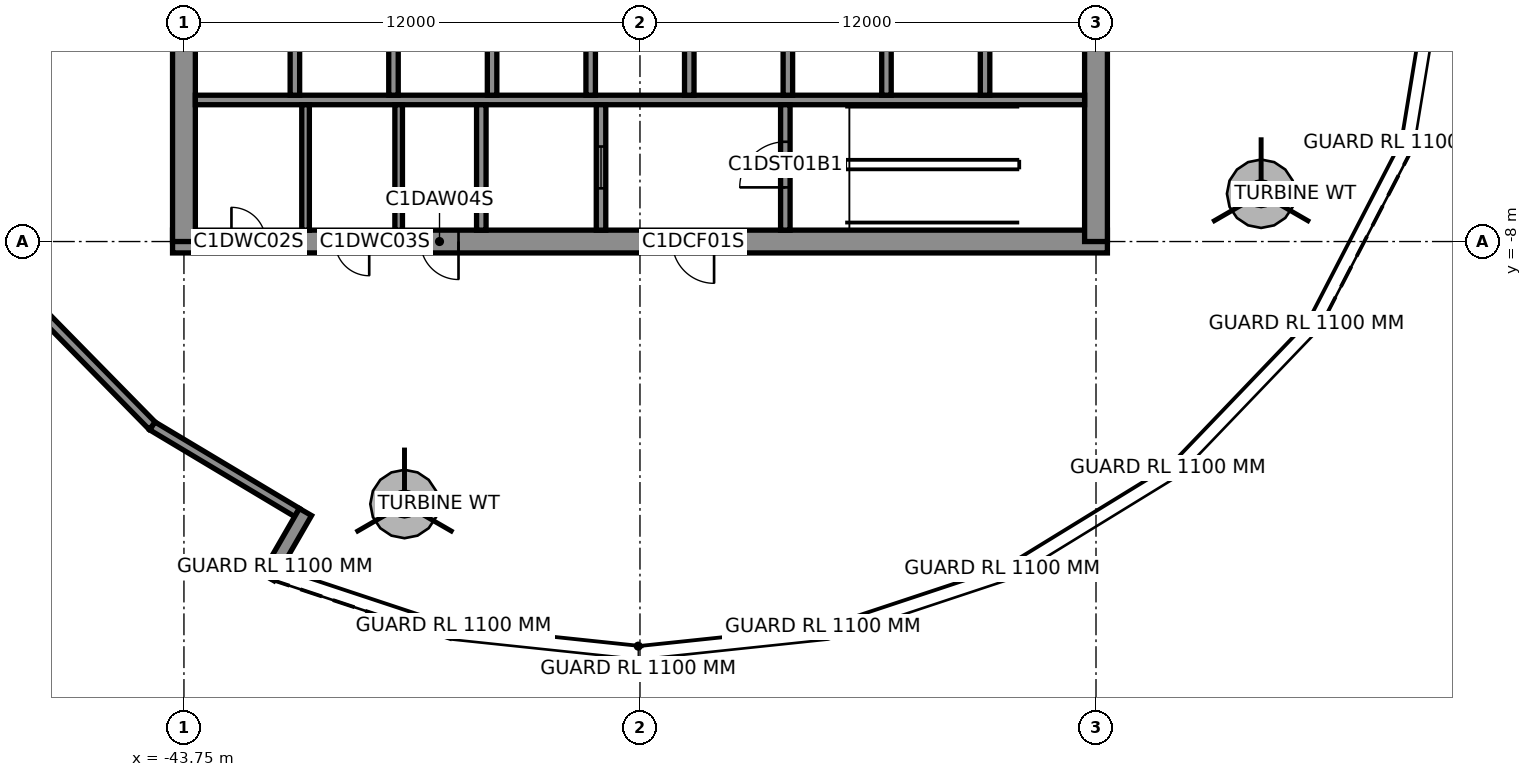
"""IFC4 building model, lengths in metres.
Left out: names, types, materials, properties, quantities, classifications, styles, units other than length and angle.
Written with IfcOpenShell. Run it as: python <this file> out.ifc"""

import sys

from ifc_helpers import new_model, si_unit, direction, frame, frame_2d, origin, place, context, subcontext, project, spatial, rectangle, extrude, element, fill, save


model = new_model("IFC4")
c1 = context("Model", 3, precision=1e-05, world=origin(), true_north=direction((0.0, 1.0)))
c2 = subcontext(c1, "Body", "Model", "MODEL_VIEW")
j1 = project(units=[si_unit("LENGTHUNIT", "METRE"), si_unit("PLANEANGLEUNIT", "RADIAN")], contexts=[c1])
p1 = place(None, origin())
s1 = spatial("IfcSite", under=j1, at=p1, CompositionType="ELEMENT")
p2 = place(p1, origin())
s2 = spatial("IfcBuilding", under=s1, at=p2, CompositionType="ELEMENT")
p3 = place(p2, frame((0.0, 0.0, 204.5)))
s3 = spatial("IfcBuildingStorey", under=s2, at=p3, CompositionType="ELEMENT", Elevation=204.5)
p4 = place(p3, frame((-44.581, -12.852, 0.0), z_axis=(0.0, 0.0, 1.0), x_axis=(-0.700565408789, 0.713588192172, 0.0)))
e1 = element("IfcWall", 1, at=p4, inside=s3, PredefinedType="STANDARD", context=c2, shape_type="SweptSolid", body=[
    extrude(rectangle(XDim=4.855, YDim=0.25, at=frame_2d((2.428, 0.0))), origin(), (0.0, 0.0, 1.0), 5.396),
])
p5 = place(p3, frame((-40.774, -15.13, 0.0), z_axis=(0.0, 0.0, 1.0), x_axis=(-0.858196185846, 0.513321835304, 0.0)))
e2 = element("IfcWall", 2, at=p5, inside=s3, PredefinedType="STANDARD", context=c2, shape_type="SweptSolid", body=[
    extrude(rectangle(XDim=4.437, YDim=0.25, at=frame_2d((2.218, 0.0))), origin(), (0.0, 0.0, 1.0), 5.396),
])
p6 = place(p3, frame((-41.543, -16.832, 0.0), z_axis=(0.0, 0.0, 1.0), x_axis=(0.500024883228, 0.866011036969, 0.0)))
e3 = element("IfcWall", 3, at=p6, inside=s3, PredefinedType="STANDARD", context=c2, shape_type="SweptSolid", body=[
    extrude(rectangle(XDim=1.98, YDim=0.37, at=frame_2d((0.99, 0.0))), origin(), (0.0, 0.0, 1.0), 5.317),
])
p7 = place(p3, frame((-44.05, -8.0, 0.0), z_axis=(0.0, 0.0, 1.0), x_axis=(1.0, 0.0, 0.0)))
e4 = element("IfcWall", 4, at=p7, inside=s3, PredefinedType="SHEAR", context=c2, shape_type="SweptSolid", body=[
    extrude(rectangle(XDim=24.6, YDim=0.6, at=frame_2d((12.3, 0.0))), origin(), (0.0, 0.0, 1.0), 6.0),
])
p8 = place(p7, frame((13.15, 0.0, 0.0)))
e5 = element("IfcOpeningElement", 5, at=p8, cuts=e4, PredefinedType="OPENING", context=c2, shape_type="SweptSolid", body=[
    extrude(rectangle(XDim=1.1, YDim=2.1, at=frame_2d((0.55, 1.05))), frame((0.0, 0.31, 0.0), z_axis=(0.0, -1.0, 0.0), x_axis=(1.0, 0.0, 0.0)), (0.0, 0.0, 1.0), 0.62),
])
p9 = place(p7, frame((1.55, 0.0, 0.0)))
e6 = element("IfcOpeningElement", 6, at=p9, cuts=e4, PredefinedType="OPENING", context=c2, shape_type="SweptSolid", body=[
    extrude(rectangle(XDim=0.9, YDim=2.1, at=frame_2d((0.45, 1.05))), frame((0.0, 0.31, 0.0), z_axis=(0.0, -1.0, 0.0), x_axis=(1.0, 0.0, 0.0)), (0.0, 0.0, 1.0), 0.62),
])
p10 = place(p7, frame((4.275, 0.0, 0.0)))
e7 = element("IfcOpeningElement", 7, at=p10, cuts=e4, PredefinedType="OPENING", context=c2, shape_type="SweptSolid", body=[
    extrude(rectangle(XDim=0.9, YDim=2.1, at=frame_2d((0.45, 1.05))), frame((0.0, 0.31, 0.0), z_axis=(0.0, -1.0, 0.0), x_axis=(1.0, 0.0, 0.0)), (0.0, 0.0, 1.0), 0.62),
])
p11 = place(p7, frame((6.525, 0.0, 0.0)))
e8 = element("IfcOpeningElement", 8, at=p11, cuts=e4, PredefinedType="OPENING", context=c2, shape_type="SweptSolid", body=[
    extrude(rectangle(XDim=1.0, YDim=2.1, at=frame_2d((0.5, 1.05))), frame((0.0, 0.31, 0.0), z_axis=(0.0, -1.0, 0.0), x_axis=(1.0, 0.0, 0.0)), (0.0, 0.0, 1.0), 0.62),
])
p12 = place(p3, frame((-19.75, -8.0, 0.0), z_axis=(0.0, 0.0, 1.0), x_axis=(0.0, 1.0, 0.0)))
e9 = element("IfcWall", 9, at=p12, inside=s3, PredefinedType="SHEAR", context=c2, shape_type="SweptSolid", body=[
    extrude(rectangle(XDim=16.0, YDim=0.6, at=frame_2d((8.0, 0.0))), origin(), (0.0, 0.0, 1.0), 6.0),
])
p13 = place(p12, frame((7.1, 0.0, 0.0)))
e10 = element("IfcOpeningElement", 10, at=p13, cuts=e9, PredefinedType="OPENING", context=c2, shape_type="SweptSolid", body=[
    extrude(rectangle(XDim=1.8, YDim=2.1, at=frame_2d((0.9, 1.05))), frame((0.0, 0.31, 0.0), z_axis=(0.0, -1.0, 0.0), x_axis=(1.0, 0.0, 0.0)), (0.0, 0.0, 1.0), 0.62),
])
p14 = place(p3, frame((-43.75, -8.0, 0.0), z_axis=(0.0, 0.0, 1.0), x_axis=(0.0, 1.0, 0.0)))
e11 = element("IfcWall", 11, at=p14, inside=s3, PredefinedType="SHEAR", context=c2, shape_type="SweptSolid", body=[
    extrude(rectangle(XDim=16.0, YDim=0.6, at=frame_2d((8.0, 0.0))), origin(), (0.0, 0.0, 1.0), 6.0),
])
p15 = place(p14, frame((7.1, 0.0, 0.0)))
e12 = element("IfcOpeningElement", 12, at=p15, cuts=e11, PredefinedType="OPENING", context=c2, shape_type="SweptSolid", body=[
    extrude(rectangle(XDim=1.8, YDim=2.1, at=frame_2d((0.9, 1.05))), frame((0.0, 0.31, 0.0), z_axis=(0.0, -1.0, 0.0), x_axis=(1.0, 0.0, 0.0)), (0.0, 0.0, 1.0), 0.62),
])
p16 = place(p3, frame((-43.45, -4.275, 0.0), z_axis=(0.0, 0.0, 1.0), x_axis=(1.0, 0.0, 0.0)))
e13 = element("IfcWall", 13, at=p16, inside=s3, PredefinedType="SHEAR", context=c2, shape_type="SweptSolid", body=[
    extrude(rectangle(XDim=23.4, YDim=0.25, at=frame_2d((11.7, 0.0))), origin(), (0.0, 0.0, 1.0), 6.0),
])
for number, where, z_axis, x_axis in (
    (14, (-40.831, -4.15, 0.0), (0.0, 0.0, 1.0), (0.0, 1.0, 0.0)),
    (15, (-38.236, -4.15, 0.0), (0.0, 0.0, 1.0), (0.0, 1.0, 0.0)),
    (16, (-35.642, -4.15, 0.0), (0.0, 0.0, 1.0), (0.0, 1.0, 0.0)),
    (17, (-33.047, -4.15, 0.0), (0.0, 0.0, 1.0), (0.0, 1.0, 0.0)),
    (18, (-30.453, -4.15, 0.0), (0.0, 0.0, 1.0), (0.0, 1.0, 0.0)),
    (19, (-27.858, -4.15, 0.0), (0.0, 0.0, 1.0), (0.0, 1.0, 0.0)),
    (20, (-25.264, -4.15, 0.0), (0.0, 0.0, 1.0), (0.0, 1.0, 0.0)),
    (21, (-22.669, -4.15, 0.0), (0.0, 0.0, 1.0), (0.0, 1.0, 0.0)),
):
    element("IfcWall", number, at=place(p3, frame(where, z_axis=z_axis, x_axis=x_axis)), inside=s3, PredefinedType="SHEAR", context=c2, shape_type="SweptSolid", body=[
        extrude(rectangle(XDim=2.4, YDim=0.25, at=frame_2d((1.2, 0.0))), origin(), (0.0, 0.0, 1.0), 6.0),
    ])
p17 = place(p3, frame((-27.925, -4.4, 0.0), z_axis=(0.0, 0.0, 1.0), x_axis=(0.0, -1.0, 0.0)))
e22 = element("IfcWall", 22, at=p17, inside=s3, PredefinedType="SHEAR", context=c2, shape_type="SweptSolid", body=[
    extrude(rectangle(XDim=3.3, YDim=0.25, at=frame_2d((1.65, 0.0))), origin(), (0.0, 0.0, 1.0), 6.0),
])
p18 = place(p17, frame((0.975, 0.0, 0.0)))
e23 = element("IfcOpeningElement", 23, at=p18, cuts=e22, PredefinedType="OPENING", context=c2, shape_type="SweptSolid", body=[
    extrude(rectangle(XDim=1.2, YDim=2.1, at=frame_2d((0.6, 1.05))), frame((0.0, 0.135, 0.0), z_axis=(0.0, -1.0, 0.0), x_axis=(1.0, 0.0, 0.0)), (0.0, 0.0, 1.0), 0.27),
])
p19 = place(p3, frame((-32.775, -4.4, 0.0), z_axis=(0.0, 0.0, 1.0), x_axis=(0.0, -1.0, 0.0)))
e24 = element("IfcWall", 24, at=p19, inside=s3, PredefinedType="SHEAR", context=c2, shape_type="SweptSolid", body=[
    extrude(rectangle(XDim=3.3, YDim=0.25, at=frame_2d((1.65, 0.0))), origin(), (0.0, 0.0, 1.0), 6.0),
])
p20 = place(p19, frame((1.1, 0.0, 0.0)))
e25 = element("IfcOpeningElement", 25, at=p20, cuts=e24, PredefinedType="OPENING", context=c2, shape_type="SweptSolid", body=[
    extrude(rectangle(XDim=1.1, YDim=2.1, at=frame_2d((0.55, 1.05))), frame((0.0, 0.135, 0.0), z_axis=(0.0, -1.0, 0.0), x_axis=(1.0, 0.0, 0.0)), (0.0, 0.0, 1.0), 0.27),
])
p21 = place(p3, frame((-35.925, -4.4, 0.0), z_axis=(0.0, 0.0, 1.0), x_axis=(0.0, -1.0, 0.0)))
e26 = element("IfcWall", 26, at=p21, inside=s3, PredefinedType="SHEAR", context=c2, shape_type="SweptSolid", body=[
    extrude(rectangle(XDim=3.3, YDim=0.25, at=frame_2d((1.65, 0.0))), origin(), (0.0, 0.0, 1.0), 6.0),
])
for number, where, z_axis, x_axis in (
    (27, (-40.55, -4.4, 0.0), (0.0, 0.0, 1.0), (0.0, -1.0, 0.0)),
    (28, (-38.1, -4.4, 0.0), (0.0, 0.0, 1.0), (0.0, -1.0, 0.0)),
):
    element("IfcWall", number, at=place(p3, frame(where, z_axis=z_axis, x_axis=x_axis)), inside=s3, PredefinedType="PARTITIONING", context=c2, shape_type="SweptSolid", body=[
        extrude(rectangle(XDim=3.3, YDim=0.2, at=frame_2d((1.65, 0.0))), origin(), (0.0, 0.0, 1.0), 6.0),
    ])
p22 = place(p3, frame((-46.304, -11.0, 0.0), z_axis=(0.0, 0.0, 1.0), x_axis=(1.0, 0.0, 0.0)))
e29 = element("IfcWall", 29, at=p22, inside=s3, PredefinedType="PARTITIONING", context=c2, shape_type="SweptSolid", body=[
    extrude(rectangle(XDim=11.607, YDim=0.2, at=frame_2d((5.803, 0.0))), origin(), (0.0, 0.0, 1.0), 5.307),
])
p23 = place(p22, frame((5.303, 0.0, 0.0)))
e30 = element("IfcOpeningElement", 30, at=p23, cuts=e29, PredefinedType="OPENING", context=c2, shape_type="SweptSolid", body=[
    extrude(rectangle(XDim=1.0, YDim=2.1, at=frame_2d((0.5, 1.05))), frame((0.0, 0.11, 0.0), z_axis=(0.0, -1.0, 0.0), x_axis=(1.0, 0.0, 0.0)), (0.0, 0.0, 1.0), 0.22),
])
p24 = place(p3, frame((-34.698, -11.0, 0.0), z_axis=(0.0, 0.0, 1.0), x_axis=(1.0, 0.0, 0.0)))
e31 = element("IfcWall", 31, at=p24, inside=s3, PredefinedType="PARTITIONING", context=c2, shape_type="SweptSolid", body=[
    extrude(rectangle(XDim=9.298, YDim=0.2, at=frame_2d((4.649, 0.0))), origin(), (0.0, 0.0, 1.0), 5.307),
])
p25 = place(p24, frame((3.039, 0.0, 0.0)))
e32 = element("IfcOpeningElement", 32, at=p25, cuts=e31, PredefinedType="OPENING", context=c2, shape_type="SweptSolid", body=[
    extrude(rectangle(XDim=1.0, YDim=2.1, at=frame_2d((0.5, 1.05))), frame((0.0, 0.11, 0.0), z_axis=(0.0, -1.0, 0.0), x_axis=(1.0, 0.0, 0.0)), (0.0, 0.0, 1.0), 0.22),
])
p26 = place(p3, frame((-25.399, -11.0, 0.0), z_axis=(0.0, 0.0, 1.0), x_axis=(1.0, 0.0, 0.0)))
e33 = element("IfcWall", 33, at=p26, inside=s3, PredefinedType="PARTITIONING", context=c2, shape_type="SweptSolid", body=[
    extrude(rectangle(XDim=8.649, YDim=0.2, at=frame_2d((4.325, 0.0))), origin(), (0.0, 0.0, 1.0), 5.307),
])
p27 = place(p26, frame((4.837, 0.0, 0.0)))
e34 = element("IfcOpeningElement", 34, at=p27, cuts=e33, PredefinedType="OPENING", context=c2, shape_type="SweptSolid", body=[
    extrude(rectangle(XDim=1.0, YDim=2.1, at=frame_2d((0.5, 1.05))), frame((0.0, 0.11, 0.0), z_axis=(0.0, -1.0, 0.0), x_axis=(1.0, 0.0, 0.0)), (0.0, 0.0, 1.0), 0.22),
])
p28 = place(p3, frame((-16.75, -10.9, 0.0), z_axis=(0.0, 0.0, 1.0), x_axis=(0.0, 1.0, 0.0)))
e35 = element("IfcWall", 35, at=p28, inside=s3, PredefinedType="PARTITIONING", context=c2, shape_type="SweptSolid", body=[
    extrude(rectangle(XDim=6.881, YDim=0.2, at=frame_2d((3.44, 0.0))), origin(), (0.0, 0.0, 1.0), 5.387),
])
p29 = place(p3, frame((-16.75, -4.019, 0.0), z_axis=(0.0, 0.0, 1.0), x_axis=(0.0, 1.0, 0.0)))
e36 = element("IfcWall", 36, at=p29, inside=s3, PredefinedType="PARTITIONING", context=c2, shape_type="SweptSolid", body=[
    extrude(rectangle(XDim=12.68, YDim=0.2, at=frame_2d((6.34, 0.0))), origin(), (0.0, 0.0, 1.0), 5.387),
])
p30 = place(p29, frame((5.84, 0.0, 0.0)))
e37 = element("IfcOpeningElement", 37, at=p30, cuts=e36, PredefinedType="OPENING", context=c2, shape_type="SweptSolid", body=[
    extrude(rectangle(XDim=1.0, YDim=2.1, at=frame_2d((0.5, 1.05))), frame((0.0, 0.11, 0.0), z_axis=(0.0, -1.0, 0.0), x_axis=(1.0, 0.0, 0.0)), (0.0, 0.0, 1.0), 0.22),
])
p31 = place(p3, frame((-46.75, 4.019, 0.0), z_axis=(0.0, 0.0, 1.0), x_axis=(0.0, -1.0, 0.0)))
e38 = element("IfcWall", 38, at=p31, inside=s3, PredefinedType="PARTITIONING", context=c2, shape_type="SweptSolid", body=[
    extrude(rectangle(XDim=12.68, YDim=0.2, at=frame_2d((6.34, 0.0))), origin(), (0.0, 0.0, 1.0), 4.999),
])
p32 = place(p31, frame((4.223, 0.0, 0.0)))
e39 = element("IfcOpeningElement", 39, at=p32, cuts=e38, PredefinedType="OPENING", context=c2, shape_type="SweptSolid", body=[
    extrude(rectangle(XDim=1.0, YDim=2.1, at=frame_2d((0.5, 1.05))), frame((0.0, 0.11, 0.0), z_axis=(0.0, -1.0, 0.0), x_axis=(1.0, 0.0, 0.0)), (0.0, 0.0, 1.0), 0.22),
])
p33 = place(p3, frame((-46.9, -8.747, 0.0), z_axis=(0.0, 0.0, 1.0), x_axis=(-0.866041403502, -0.499972286653, 0.0)))
e40 = element("IfcWall", 40, at=p33, inside=s3, PredefinedType="PARTITIONING", context=c2, shape_type="SweptSolid", body=[
    extrude(rectangle(XDim=1.212, YDim=0.2, at=frame_2d((0.606, 0.0))), origin(), (0.0, 0.0, 1.0), 5.485),
])
p34 = place(p3, frame((-36.699, -18.471, 0.0), z_axis=(0.0, 0.0, 1.0), x_axis=(0.258825414689, 0.965924119541, 0.0)))
e41 = element("IfcWall", 41, at=p34, inside=s3, PredefinedType="PARTITIONING", context=c2, shape_type="SweptSolid", body=[
    extrude(rectangle(XDim=7.604, YDim=0.2, at=frame_2d((3.802, 0.0))), origin(), (0.0, 0.0, 1.0), 5.307),
])
p35 = place(p3, frame((-21.963, -16.951, 0.0), z_axis=(0.0, 0.0, 1.0), x_axis=(-0.499988525892, 0.866032028263, 0.0)))
e42 = element("IfcWall", 42, at=p35, inside=s3, PredefinedType="PARTITIONING", context=c2, shape_type="SweptSolid", body=[
    extrude(rectangle(XDim=6.698, YDim=0.2, at=frame_2d((3.349, 0.0))), origin(), (0.0, 0.0, 1.0), 5.307),
])
p36 = place(p3, frame((-11.376, -5.459, 0.0), z_axis=(0.0, 0.0, 1.0), x_axis=(-0.965923982135, 0.25882592748, 0.0)))
e43 = element("IfcWall", 43, at=p36, inside=s3, PredefinedType="PARTITIONING", context=c2, shape_type="SweptSolid", body=[
    extrude(rectangle(XDim=5.433, YDim=0.2, at=frame_2d((2.717, 0.0))), origin(), (0.0, 0.0, 1.0), 5.387),
])
p37 = place(p8, origin())
e44 = element("IfcDoor", 44, at=p37, inside=s3, OperationType="SINGLE_SWING_RIGHT", PredefinedType="DOOR", context=c2, shape_type="SweptSolid", body=[
    extrude(rectangle(XDim=1.1, YDim=2.1, at=frame_2d((0.55, 1.05))), frame((0.0, 0.3, 0.0), z_axis=(0.0, -1.0, 0.0), x_axis=(1.0, 0.0, 0.0)), (0.0, 0.0, 1.0), 0.05),
])
fill(e5, e44)
p38 = place(p9, origin())
e45 = element("IfcDoor", 45, at=p38, inside=s3, OperationType="SINGLE_SWING_LEFT", PredefinedType="DOOR", context=c2, shape_type="SweptSolid", body=[
    extrude(rectangle(XDim=0.9, YDim=2.1, at=frame_2d((0.45, 1.05))), frame((0.0, 0.3, 0.0), z_axis=(0.0, -1.0, 0.0), x_axis=(1.0, 0.0, 0.0)), (0.0, 0.0, 1.0), 0.05),
])
fill(e6, e45)
p39 = place(p10, origin())
e46 = element("IfcDoor", 46, at=p39, inside=s3, OperationType="SINGLE_SWING_RIGHT", PredefinedType="DOOR", context=c2, shape_type="SweptSolid", body=[
    extrude(rectangle(XDim=0.9, YDim=2.1, at=frame_2d((0.45, 1.05))), frame((0.0, 0.3, 0.0), z_axis=(0.0, -1.0, 0.0), x_axis=(1.0, 0.0, 0.0)), (0.0, 0.0, 1.0), 0.05),
])
fill(e7, e46)
p40 = place(p11, origin())
e47 = element("IfcDoor", 47, at=p40, inside=s3, OperationType="SINGLE_SWING_RIGHT", PredefinedType="DOOR", context=c2, shape_type="SweptSolid", body=[
    extrude(rectangle(XDim=1.0, YDim=2.1, at=frame_2d((0.5, 1.05))), frame((0.0, 0.3, 0.0), z_axis=(0.0, -1.0, 0.0), x_axis=(1.0, 0.0, 0.0)), (0.0, 0.0, 1.0), 0.05),
])
fill(e8, e47)
p41 = place(p18, origin())
e48 = element("IfcDoor", 48, at=p41, inside=s3, OperationType="SINGLE_SWING_RIGHT", PredefinedType="DOOR", context=c2, shape_type="SweptSolid", body=[
    extrude(rectangle(XDim=1.2, YDim=2.1, at=frame_2d((0.6, 1.05))), frame((0.0, 0.025, 0.0), z_axis=(0.0, -1.0, 0.0), x_axis=(1.0, 0.0, 0.0)), (0.0, 0.0, 1.0), 0.05),
])
fill(e23, e48)
p42 = place(p20, origin())
e49 = element("IfcDoor", 49, at=p42, inside=s3, OperationType="DOUBLE_DOOR_SLIDING", PredefinedType="DOOR", context=c2, shape_type="SweptSolid", body=[
    extrude(rectangle(XDim=1.1, YDim=2.1, at=frame_2d((0.55, 1.05))), frame((0.0, 0.025, 0.0), z_axis=(0.0, -1.0, 0.0), x_axis=(1.0, 0.0, 0.0)), (0.0, 0.0, 1.0), 0.05),
])
fill(e25, e49)
p43 = place(p23, origin())
e50 = element("IfcDoor", 50, at=p43, inside=s3, OperationType="SINGLE_SWING_RIGHT", PredefinedType="DOOR", context=c2, shape_type="SweptSolid", body=[
    extrude(rectangle(XDim=1.0, YDim=2.1, at=frame_2d((0.5, 1.05))), frame((0.0, 0.025, 0.0), z_axis=(0.0, -1.0, 0.0), x_axis=(1.0, 0.0, 0.0)), (0.0, 0.0, 1.0), 0.05),
])
fill(e30, e50)
p44 = place(p25, origin())
e51 = element("IfcDoor", 51, at=p44, inside=s3, OperationType="SINGLE_SWING_LEFT", PredefinedType="DOOR", context=c2, shape_type="SweptSolid", body=[
    extrude(rectangle(XDim=1.0, YDim=2.1, at=frame_2d((0.5, 1.05))), frame((0.0, 0.025, 0.0), z_axis=(0.0, -1.0, 0.0), x_axis=(1.0, 0.0, 0.0)), (0.0, 0.0, 1.0), 0.05),
])
fill(e32, e51)
p45 = place(p27, origin())
e52 = element("IfcDoor", 52, at=p45, inside=s3, OperationType="SINGLE_SWING_RIGHT", PredefinedType="DOOR", context=c2, shape_type="SweptSolid", body=[
    extrude(rectangle(XDim=1.0, YDim=2.1, at=frame_2d((0.5, 1.05))), frame((0.0, 0.025, 0.0), z_axis=(0.0, -1.0, 0.0), x_axis=(1.0, 0.0, 0.0)), (0.0, 0.0, 1.0), 0.05),
])
fill(e34, e52)
save(model, sys.argv[1])
